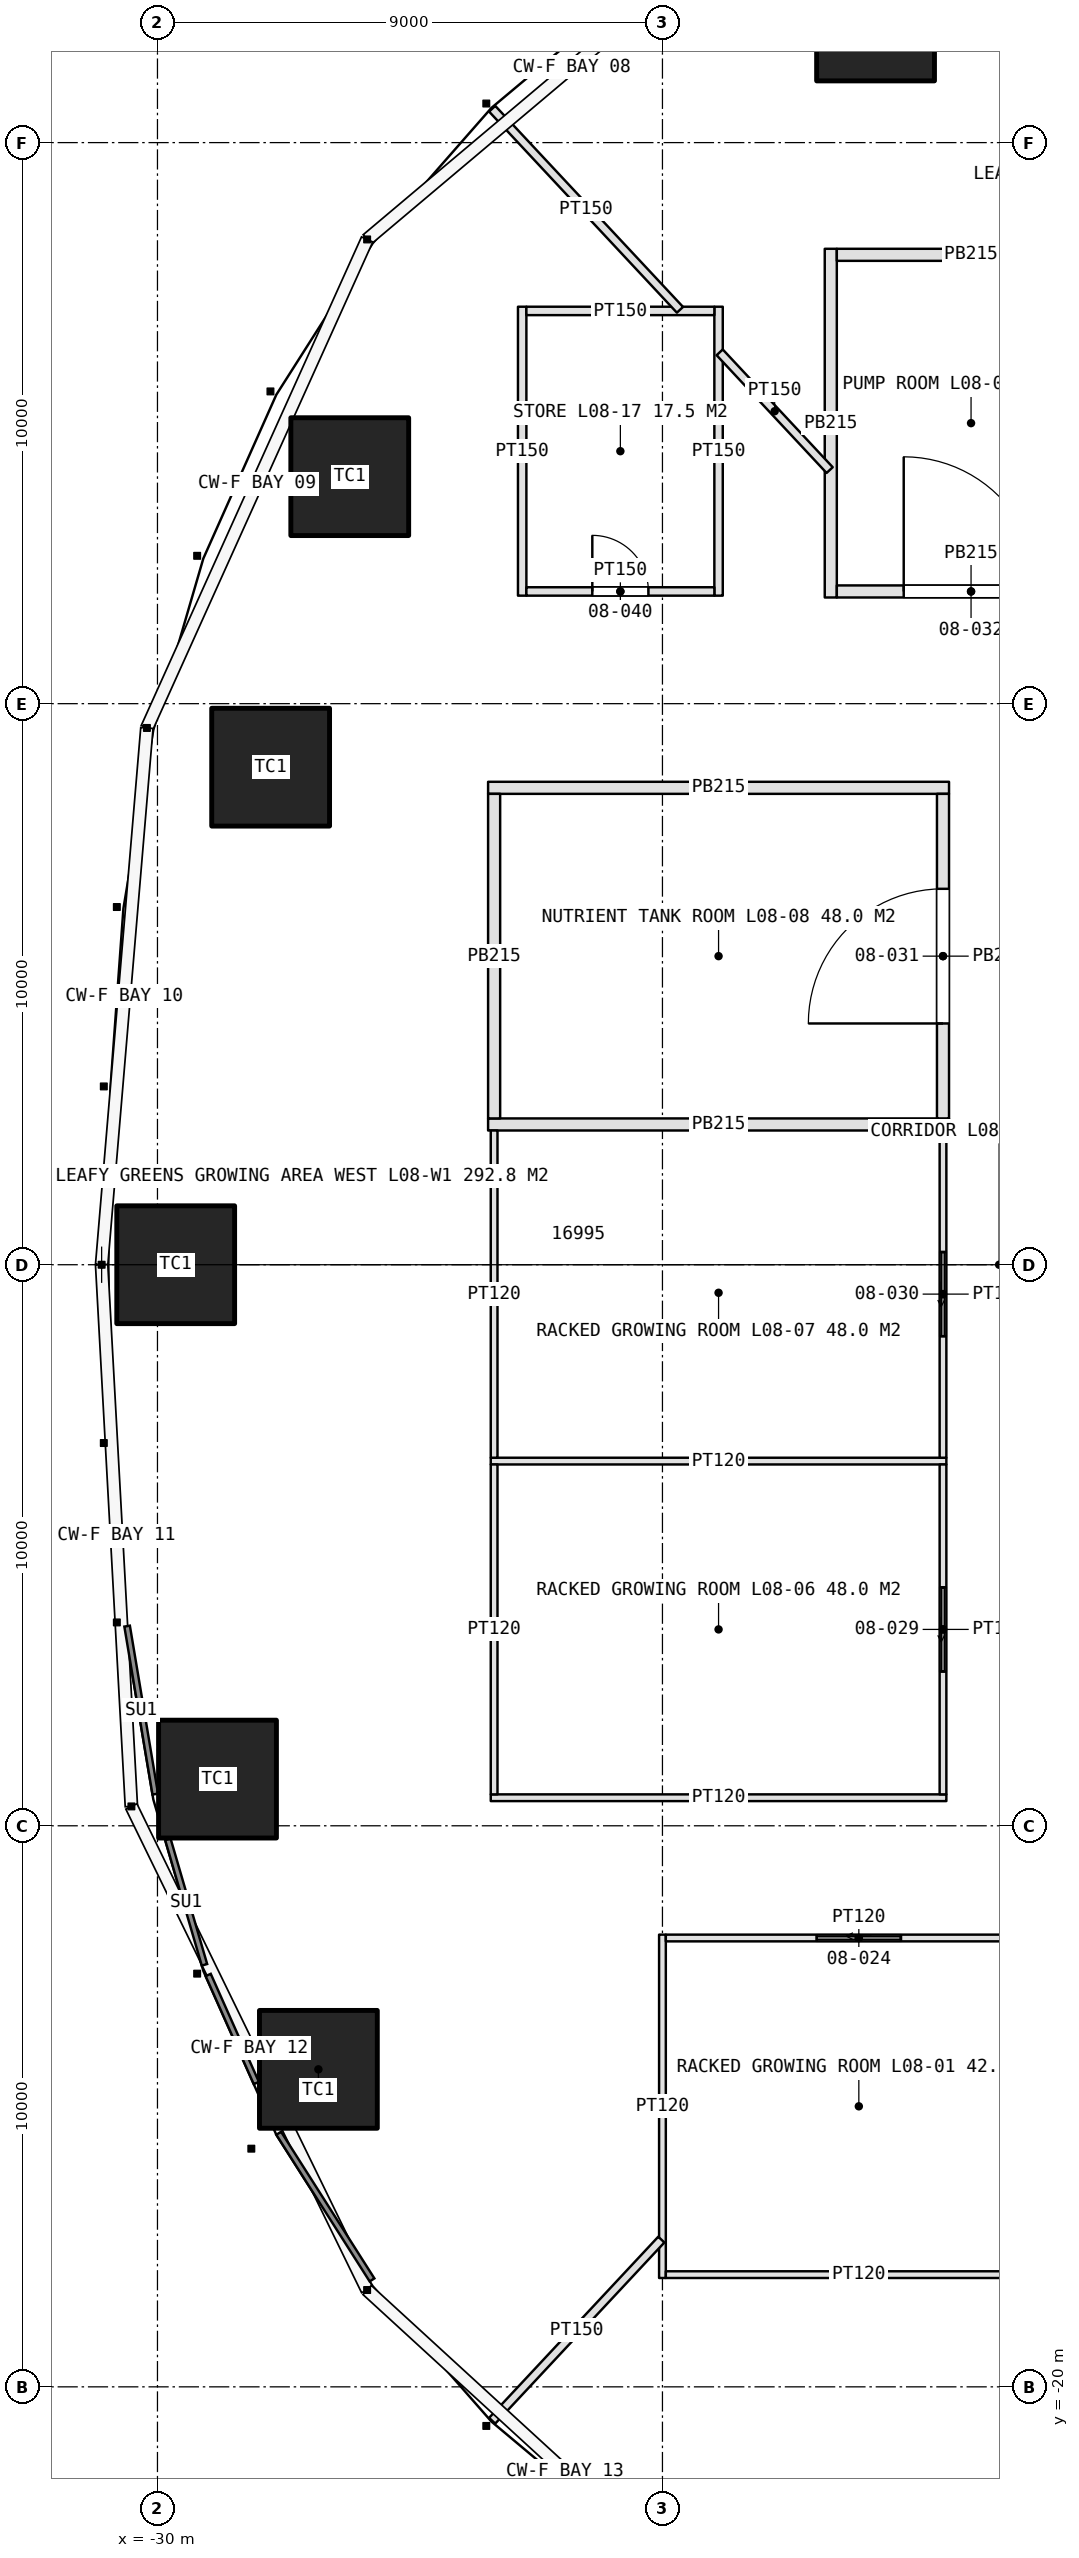
"""IFC4 building model, lengths in metres.
Left out: names, types, materials, properties, quantities, classifications, styles, units other than length and angle.
Written with IfcOpenShell. Run it as: python <this file> out.ifc"""

import sys

from ifc_helpers import new_model, si_unit, direction, frame, frame_2d, origin, origin_2d, place, context, subcontext, project, spatial, rectangle, extrude, element, fill, save


model = new_model("IFC4")
c1 = context("Model", 3, precision=1e-05, world=origin(), true_north=direction((0.0, 1.0)))
c2 = subcontext(c1, "Body", "Model", "MODEL_VIEW")
j1 = project(units=[si_unit("LENGTHUNIT", "METRE"), si_unit("PLANEANGLEUNIT", "RADIAN")], contexts=[c1])
p1 = place(None, origin())
s1 = spatial("IfcSite", under=j1, at=p1, CompositionType="ELEMENT")
p2 = place(p1, origin())
s2 = spatial("IfcBuilding", under=s1, at=p2, CompositionType="ELEMENT")
p3 = place(p2, frame((0.0, 0.0, 40.0)))
s3 = spatial("IfcBuildingStorey", under=s2, at=p3, CompositionType="ELEMENT", Elevation=40.0)
for number, where, z_axis, x_axis in (
    (1, (-17.202, 22.15, 0.0), (0.0, 0.0, 1.0), (1.0, 0.0, 0.0)),
    (2, (-26.573, 14.046, 0.0), (0.0, 0.0, 1.0), (1.0, 0.0, 0.0)),
    (3, (-27.983, 8.868, 0.0), (0.0, 0.0, 1.0), (1.0, 0.0, 0.0)),
    (4, (-29.675, 0.0, 0.0), (0.0, 0.0, 1.0), (1.0, 0.0, 0.0)),
    (5, (-28.93, -9.168, 0.0), (0.0, 0.0, 1.0), (1.0, 0.0, 0.0)),
    (6, (-27.132, -14.341, 0.0), (0.0, 0.0, 1.0), (1.0, 0.0, 0.0)),
):
    element("IfcColumn", number, at=place(p3, frame(where, z_axis=z_axis, x_axis=x_axis)), inside=s3, PredefinedType="COLUMN", context=c2, shape_type="SweptSolid", body=[
        extrude(rectangle(XDim=2.1, YDim=2.1, at=origin_2d()), origin(), (0.0, 0.0, 1.0), 5.0),
    ])
p4 = place(p3, frame((-21.0, -11.94, 0.0), z_axis=(0.0, 0.0, 1.0), x_axis=(0.0, -1.0, 0.0)))
e7 = element("IfcWall", 7, at=p4, inside=s3, PredefinedType="PARTITIONING", context=c2, shape_type="SweptSolid", body=[
    extrude(rectangle(XDim=6.12, YDim=0.12, at=frame_2d((3.06, 0.0))), origin(), (0.0, 0.0, 1.0), 3.6),
])
p5 = place(p3, frame((-20.94, -12.0, 0.0), z_axis=(0.0, 0.0, 1.0), x_axis=(1.0, 0.0, 0.0)))
e8 = element("IfcWall", 8, at=p5, inside=s3, PredefinedType="PARTITIONING", context=c2, shape_type="SweptSolid", body=[
    extrude(rectangle(XDim=6.88, YDim=0.12, at=frame_2d((3.44, 0.0))), origin(), (0.0, 0.0, 1.0), 3.6),
])
p6 = place(p5, frame((2.69, 0.0, 0.0)))
e9 = element("IfcOpeningElement", 9, at=p6, cuts=e8, PredefinedType="OPENING", context=c2, shape_type="SweptSolid", body=[
    extrude(rectangle(XDim=1.5, YDim=2.5, at=frame_2d((0.75, 1.25))), frame((0.0, 0.07, 0.0), z_axis=(0.0, -1.0, 0.0), x_axis=(1.0, 0.0, 0.0)), (0.0, 0.0, 1.0), 0.14),
])
p7 = place(p3, frame((-20.94, -18.0, 0.0), z_axis=(0.0, 0.0, 1.0), x_axis=(1.0, 0.0, 0.0)))
e10 = element("IfcWall", 10, at=p7, inside=s3, PredefinedType="PARTITIONING", context=c2, shape_type="SweptSolid", body=[
    extrude(rectangle(XDim=6.88, YDim=0.12, at=frame_2d((3.44, 0.0))), origin(), (0.0, 0.0, 1.0), 3.6),
])
for number, where, z_axis, x_axis in (
    (11, (-15.94, -9.5, 0.0), (0.0, 0.0, 1.0), (-1.0, 0.0, 0.0)),
    (12, (-15.94, -3.5, 0.0), (0.0, 0.0, 1.0), (-1.0, 0.0, 0.0)),
):
    element("IfcWall", number, at=place(p3, frame(where, z_axis=z_axis, x_axis=x_axis)), inside=s3, PredefinedType="PARTITIONING", context=c2, shape_type="SweptSolid", body=[
        extrude(rectangle(XDim=8.12, YDim=0.12, at=frame_2d((4.06, 0.0))), origin(), (0.0, 0.0, 1.0), 3.6),
    ])
for number, where, z_axis, x_axis in (
    (13, (-15.893, 2.5, 0.0), (0.0, 0.0, 1.0), (-1.0, 0.0, 0.0)),
    (14, (-15.893, 8.5, 0.0), (0.0, 0.0, 1.0), (-1.0, 0.0, 0.0)),
):
    element("IfcWall", number, at=place(p3, frame(where, z_axis=z_axis, x_axis=x_axis)), inside=s3, PredefinedType="PARTITIONING", context=c2, shape_type="SweptSolid", body=[
        extrude(rectangle(XDim=8.215, YDim=0.215, at=frame_2d((4.107, 0.0))), origin(), (0.0, 0.0, 1.0), 3.6),
    ])
p8 = place(p3, frame((-16.0, -9.44, 0.0), z_axis=(0.0, 0.0, 1.0), x_axis=(0.0, 1.0, 0.0)))
e15 = element("IfcWall", 15, at=p8, inside=s3, PredefinedType="PARTITIONING", context=c2, shape_type="SweptSolid", body=[
    extrude(rectangle(XDim=5.88, YDim=0.12, at=frame_2d((2.94, 0.0))), origin(), (0.0, 0.0, 1.0), 3.6),
])
p9 = place(p8, frame((2.19, 0.0, 0.0)))
e16 = element("IfcOpeningElement", 16, at=p9, cuts=e15, PredefinedType="OPENING", context=c2, shape_type="SweptSolid", body=[
    extrude(rectangle(XDim=1.5, YDim=2.5, at=frame_2d((0.75, 1.25))), frame((0.0, 0.07, 0.0), z_axis=(0.0, -1.0, 0.0), x_axis=(1.0, 0.0, 0.0)), (0.0, 0.0, 1.0), 0.14),
])
p10 = place(p3, frame((-24.0, -9.44, 0.0), z_axis=(0.0, 0.0, 1.0), x_axis=(0.0, 1.0, 0.0)))
e17 = element("IfcWall", 17, at=p10, inside=s3, PredefinedType="PARTITIONING", context=c2, shape_type="SweptSolid", body=[
    extrude(rectangle(XDim=5.88, YDim=0.12, at=frame_2d((2.94, 0.0))), origin(), (0.0, 0.0, 1.0), 3.6),
])
p11 = place(p3, frame((-16.0, -3.44, 0.0), z_axis=(0.0, 0.0, 1.0), x_axis=(0.0, 1.0, 0.0)))
e18 = element("IfcWall", 18, at=p11, inside=s3, PredefinedType="PARTITIONING", context=c2, shape_type="SweptSolid", body=[
    extrude(rectangle(XDim=5.833, YDim=0.12, at=frame_2d((2.916, 0.0))), origin(), (0.0, 0.0, 1.0), 3.6),
])
p12 = place(p11, frame((2.166, 0.0, 0.0)))
e19 = element("IfcOpeningElement", 19, at=p12, cuts=e18, PredefinedType="OPENING", context=c2, shape_type="SweptSolid", body=[
    extrude(rectangle(XDim=1.5, YDim=2.5, at=frame_2d((0.75, 1.25))), frame((0.0, 0.07, 0.0), z_axis=(0.0, -1.0, 0.0), x_axis=(1.0, 0.0, 0.0)), (0.0, 0.0, 1.0), 0.14),
])
p13 = place(p3, frame((-24.0, -3.44, 0.0), z_axis=(0.0, 0.0, 1.0), x_axis=(0.0, 1.0, 0.0)))
e20 = element("IfcWall", 20, at=p13, inside=s3, PredefinedType="PARTITIONING", context=c2, shape_type="SweptSolid", body=[
    extrude(rectangle(XDim=5.833, YDim=0.12, at=frame_2d((2.916, 0.0))), origin(), (0.0, 0.0, 1.0), 3.6),
])
p14 = place(p3, frame((-16.0, 2.607, 0.0), z_axis=(0.0, 0.0, 1.0), x_axis=(0.0, 1.0, 0.0)))
e21 = element("IfcWall", 21, at=p14, inside=s3, PredefinedType="PARTITIONING", context=c2, shape_type="SweptSolid", body=[
    extrude(rectangle(XDim=5.785, YDim=0.215, at=frame_2d((2.893, 0.0))), origin(), (0.0, 0.0, 1.0), 3.6),
])
p15 = place(p14, frame((1.692, 0.0, 0.0)))
e22 = element("IfcOpeningElement", 22, at=p15, cuts=e21, PredefinedType="OPENING", context=c2, shape_type="SweptSolid", body=[
    extrude(rectangle(XDim=2.4, YDim=2.4, at=frame_2d((1.2, 1.2))), frame((0.0, 0.118, 0.0), z_axis=(0.0, -1.0, 0.0), x_axis=(1.0, 0.0, 0.0)), (0.0, 0.0, 1.0), 0.235),
])
p16 = place(p3, frame((-24.0, 2.607, 0.0), z_axis=(0.0, 0.0, 1.0), x_axis=(0.0, 1.0, 0.0)))
e23 = element("IfcWall", 23, at=p16, inside=s3, PredefinedType="PARTITIONING", context=c2, shape_type="SweptSolid", body=[
    extrude(rectangle(XDim=5.785, YDim=0.215, at=frame_2d((2.893, 0.0))), origin(), (0.0, 0.0, 1.0), 3.6),
])
p17 = place(p3, frame((-18.0, 11.893, 0.0), z_axis=(0.0, 0.0, 1.0), x_axis=(0.0, 1.0, 0.0)))
e24 = element("IfcWall", 24, at=p17, inside=s3, PredefinedType="PARTITIONING", context=c2, shape_type="SweptSolid", body=[
    extrude(rectangle(XDim=6.215, YDim=0.215, at=frame_2d((3.107, 0.0))), origin(), (0.0, 0.0, 1.0), 3.6),
])
p18 = place(p3, frame((-17.893, 12.0, 0.0), z_axis=(0.0, 0.0, 1.0), x_axis=(1.0, 0.0, 0.0)))
e25 = element("IfcWall", 25, at=p18, inside=s3, PredefinedType="PARTITIONING", context=c2, shape_type="SweptSolid", body=[
    extrude(rectangle(XDim=4.785, YDim=0.215, at=frame_2d((2.393, 0.0))), origin(), (0.0, 0.0, 1.0), 3.6),
])
p19 = place(p18, frame((1.192, 0.0, 0.0)))
e26 = element("IfcOpeningElement", 26, at=p19, cuts=e25, PredefinedType="OPENING", context=c2, shape_type="SweptSolid", body=[
    extrude(rectangle(XDim=2.4, YDim=2.4, at=frame_2d((1.2, 1.2))), frame((0.0, 0.118, 0.0), z_axis=(0.0, -1.0, 0.0), x_axis=(1.0, 0.0, 0.0)), (0.0, 0.0, 1.0), 0.235),
])
p20 = place(p3, frame((-17.893, 18.0, 0.0), z_axis=(0.0, 0.0, 1.0), x_axis=(1.0, 0.0, 0.0)))
e27 = element("IfcWall", 27, at=p20, inside=s3, PredefinedType="PARTITIONING", context=c2, shape_type="SweptSolid", body=[
    extrude(rectangle(XDim=4.785, YDim=0.215, at=frame_2d((2.393, 0.0))), origin(), (0.0, 0.0, 1.0), 3.6),
])
for number, where, z_axis, x_axis in (
    (28, (-23.5, 11.925, 0.0), (0.0, 0.0, 1.0), (0.0, 1.0, 0.0)),
    (29, (-20.0, 11.925, 0.0), (0.0, 0.0, 1.0), (0.0, 1.0, 0.0)),
):
    element("IfcWall", number, at=place(p3, frame(where, z_axis=z_axis, x_axis=x_axis)), inside=s3, PredefinedType="PARTITIONING", context=c2, shape_type="SweptSolid", body=[
        extrude(rectangle(XDim=5.15, YDim=0.15, at=frame_2d((2.575, 0.0))), origin(), (0.0, 0.0, 1.0), 3.6),
    ])
p21 = place(p3, frame((-23.425, 12.0, 0.0), z_axis=(0.0, 0.0, 1.0), x_axis=(1.0, 0.0, 0.0)))
e30 = element("IfcWall", 30, at=p21, inside=s3, PredefinedType="PARTITIONING", context=c2, shape_type="SweptSolid", body=[
    extrude(rectangle(XDim=3.35, YDim=0.15, at=frame_2d((1.675, 0.0))), origin(), (0.0, 0.0, 1.0), 3.6),
])
p22 = place(p21, frame((1.175, 0.0, 0.0)))
e31 = element("IfcOpeningElement", 31, at=p22, cuts=e30, PredefinedType="OPENING", context=c2, shape_type="SweptSolid", body=[
    extrude(rectangle(XDim=1.0, YDim=2.2, at=frame_2d((0.5, 1.1))), frame((0.0, 0.085, 0.0), z_axis=(0.0, -1.0, 0.0), x_axis=(1.0, 0.0, 0.0)), (0.0, 0.0, 1.0), 0.17),
])
p23 = place(p3, frame((-23.425, 17.0, 0.0), z_axis=(0.0, 0.0, 1.0), x_axis=(1.0, 0.0, 0.0)))
e32 = element("IfcWall", 32, at=p23, inside=s3, PredefinedType="PARTITIONING", context=c2, shape_type="SweptSolid", body=[
    extrude(rectangle(XDim=3.35, YDim=0.15, at=frame_2d((1.675, 0.0))), origin(), (0.0, 0.0, 1.0), 3.6),
])
p24 = place(p3, frame((-21.02, -17.375, 0.0), z_axis=(0.0, 0.0, 1.0), x_axis=(-0.682511222631, -0.730875113123, 0.0)))
e33 = element("IfcWall", 33, at=p24, inside=s3, PredefinedType="PARTITIONING", context=c2, shape_type="SweptSolid", body=[
    extrude(rectangle(XDim=4.417, YDim=0.15, at=frame_2d((2.208, 0.0))), origin(), (0.0, 0.0, 1.0), 3.6),
])
p25 = place(p3, frame((-20.688, 17.02, 0.0), z_axis=(0.0, 0.0, 1.0), x_axis=(-0.682520458914, 0.730866487919, 0.0)))
e34 = element("IfcWall", 34, at=p25, inside=s3, PredefinedType="PARTITIONING", context=c2, shape_type="SweptSolid", body=[
    extrude(rectangle(XDim=4.903, YDim=0.15, at=frame_2d((2.452, 0.0))), origin(), (0.0, 0.0, 1.0), 3.6),
])
p26 = place(p3, frame((-18.02, 14.163, 0.0), z_axis=(0.0, 0.0, 1.0), x_axis=(-0.682506029746, 0.730879962347, 0.0)))
e35 = element("IfcWall", 35, at=p26, inside=s3, PredefinedType="PARTITIONING", context=c2, shape_type="SweptSolid", body=[
    extrude(rectangle(XDim=2.872, YDim=0.15, at=frame_2d((1.436, 0.0))), origin(), (0.0, 0.0, 1.0), 3.6),
])
p27 = place(p6, origin())
e36 = element("IfcDoor", 36, at=p27, inside=s3, OperationType="SLIDING_TO_LEFT", PredefinedType="DOOR", context=c2, shape_type="SweptSolid", body=[
    extrude(rectangle(XDim=1.5, YDim=2.5, at=frame_2d((0.75, 1.25))), frame((0.0, 0.025, 0.0), z_axis=(0.0, -1.0, 0.0), x_axis=(1.0, 0.0, 0.0)), (0.0, 0.0, 1.0), 0.05),
])
fill(e9, e36)
p28 = place(p9, origin())
e37 = element("IfcDoor", 37, at=p28, inside=s3, OperationType="SLIDING_TO_LEFT", PredefinedType="DOOR", context=c2, shape_type="SweptSolid", body=[
    extrude(rectangle(XDim=1.5, YDim=2.5, at=frame_2d((0.75, 1.25))), frame((0.0, 0.025, 0.0), z_axis=(0.0, -1.0, 0.0), x_axis=(1.0, 0.0, 0.0)), (0.0, 0.0, 1.0), 0.05),
])
fill(e16, e37)
p29 = place(p12, origin())
e38 = element("IfcDoor", 38, at=p29, inside=s3, OperationType="SLIDING_TO_LEFT", PredefinedType="DOOR", context=c2, shape_type="SweptSolid", body=[
    extrude(rectangle(XDim=1.5, YDim=2.5, at=frame_2d((0.75, 1.25))), frame((0.0, 0.025, 0.0), z_axis=(0.0, -1.0, 0.0), x_axis=(1.0, 0.0, 0.0)), (0.0, 0.0, 1.0), 0.05),
])
fill(e19, e38)
p30 = place(p15, origin())
e39 = element("IfcDoor", 39, at=p30, inside=s3, OperationType="DOUBLE_DOOR_SINGLE_SWING", PredefinedType="DOOR", context=c2, shape_type="SweptSolid", body=[
    extrude(rectangle(XDim=2.4, YDim=2.4, at=frame_2d((1.2, 1.2))), frame((0.0, 0.025, 0.0), z_axis=(0.0, -1.0, 0.0), x_axis=(1.0, 0.0, 0.0)), (0.0, 0.0, 1.0), 0.05),
])
fill(e22, e39)
p31 = place(p19, origin())
e40 = element("IfcDoor", 40, at=p31, inside=s3, OperationType="DOUBLE_DOOR_SINGLE_SWING", PredefinedType="DOOR", context=c2, shape_type="SweptSolid", body=[
    extrude(rectangle(XDim=2.4, YDim=2.4, at=frame_2d((1.2, 1.2))), frame((0.0, 0.025, 0.0), z_axis=(0.0, -1.0, 0.0), x_axis=(1.0, 0.0, 0.0)), (0.0, 0.0, 1.0), 0.05),
])
fill(e26, e40)
p32 = place(p22, origin())
e41 = element("IfcDoor", 41, at=p32, inside=s3, OperationType="SINGLE_SWING_LEFT", PredefinedType="DOOR", context=c2, shape_type="SweptSolid", body=[
    extrude(rectangle(XDim=1.0, YDim=2.2, at=frame_2d((0.5, 1.1))), frame((0.0, 0.025, 0.0), z_axis=(0.0, -1.0, 0.0), x_axis=(1.0, 0.0, 0.0)), (0.0, 0.0, 1.0), 0.05),
])
fill(e31, e41)
save(model, sys.argv[1])
